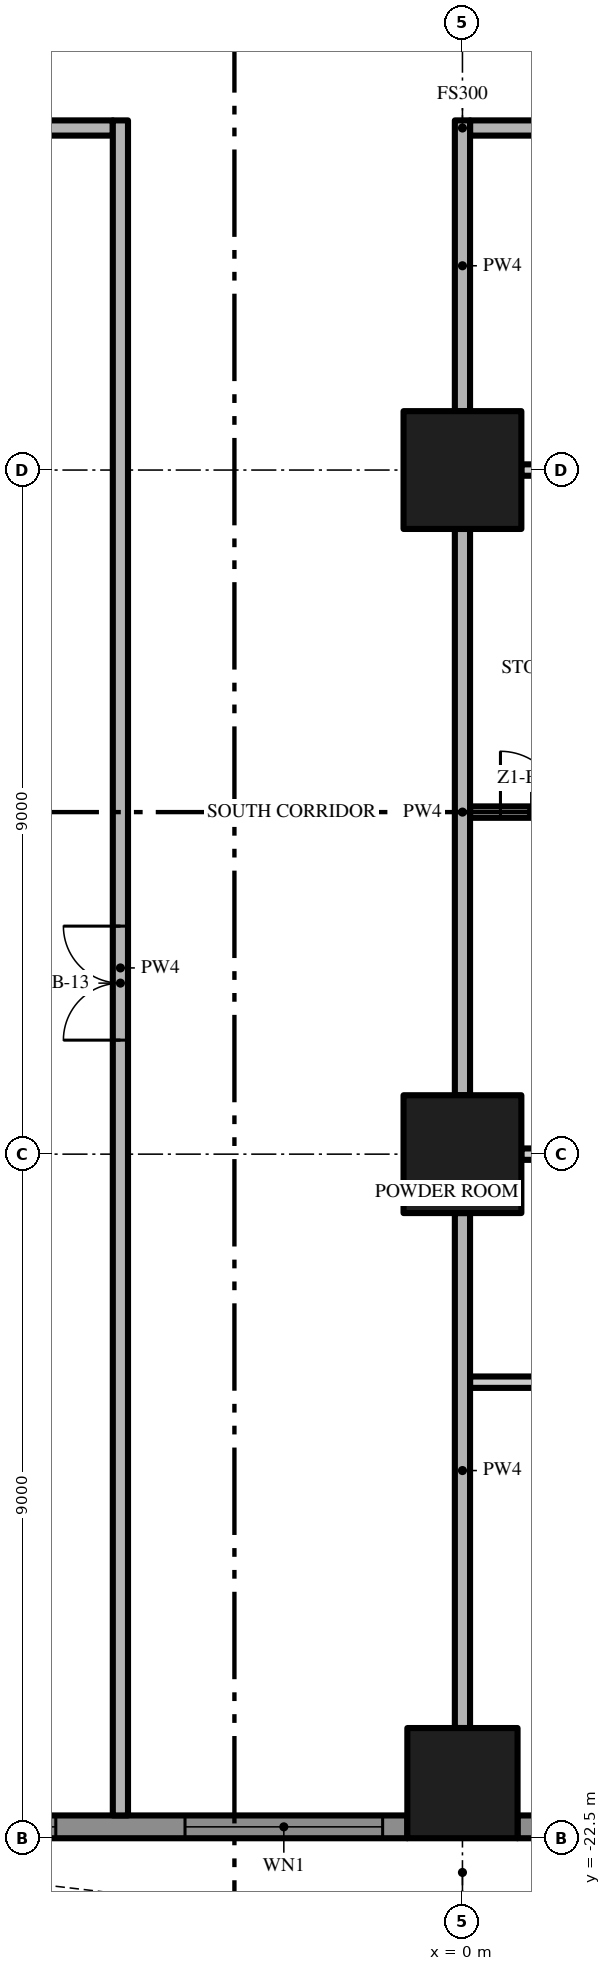
"""IFC4 building model, lengths in metres.
Left out: names, types, materials, properties, quantities, classifications, styles, units other than length and angle.
Written with IfcOpenShell. Run it as: python <this file> out.ifc"""

import sys

from ifc_helpers import new_model, si_unit, direction, frame, frame_2d, origin, origin_2d, place, context, subcontext, project, spatial, polyline, rectangle, outline, extrude, element, fill, save


model = new_model("IFC4")
c1 = context("Model", 3, precision=1e-05, world=origin(), true_north=direction((0.0, 1.0)))
c2 = subcontext(c1, "Body", "Model", "MODEL_VIEW")
j1 = project(units=[si_unit("LENGTHUNIT", "METRE"), si_unit("PLANEANGLEUNIT", "RADIAN")], contexts=[c1])
p1 = place(None, origin())
s1 = spatial("IfcSite", under=j1, at=p1, CompositionType="ELEMENT")
p2 = place(p1, origin())
s2 = spatial("IfcBuilding", under=s1, at=p2, CompositionType="ELEMENT")
p3 = place(p2, frame((0.0, 0.0, 34.0)))
s3 = spatial("IfcBuildingStorey", under=s2, at=p3, CompositionType="ELEMENT", Elevation=34.0)
p4 = place(p3, frame((0.0, -13.5, 0.0), z_axis=(0.0, 0.0, 1.0), x_axis=(1.0, 0.0, 0.0)))
e1 = element("IfcColumn", 1, at=p4, inside=s3, PredefinedType="COLUMN", context=c2, shape_type="SweptSolid", body=[
    extrude(rectangle(XDim=1.55, YDim=1.55, at=origin_2d()), origin(), (0.0, 0.0, 1.0), 3.5),
])
p5 = place(p3, frame((0.0, -21.775, 0.0), z_axis=(0.0, 0.0, 1.0), x_axis=(1.0, 0.0, 0.0)))
e2 = element("IfcColumn", 2, at=p5, inside=s3, PredefinedType="COLUMN", context=c2, shape_type="SweptSolid", body=[
    extrude(rectangle(XDim=1.45, YDim=1.45, at=origin_2d()), origin(), (0.0, 0.0, 1.0), 3.5),
])
p6 = place(p3, frame((0.0, -4.5, 0.0), z_axis=(0.0, 0.0, 1.0), x_axis=(1.0, 0.0, 0.0)))
e3 = element("IfcColumn", 3, at=p6, inside=s3, PredefinedType="COLUMN", context=c2, shape_type="SweptSolid", body=[
    extrude(rectangle(XDim=1.55, YDim=1.55, at=origin_2d()), origin(), (0.0, 0.0, 1.0), 3.5),
])
p7 = place(p3, frame((-0.725, -22.35, 0.0), z_axis=(0.0, 0.0, 1.0), x_axis=(-1.0, 0.0, 0.0)))
e4 = element("IfcWall", 4, at=p7, inside=s3, PredefinedType="SOLIDWALL", context=c2, shape_type="SweptSolid", body=[
    extrude(rectangle(XDim=7.55, YDim=0.3, at=frame_2d((3.775, 0.0))), origin(), (0.0, 0.0, 1.0), 3.5),
])
p8 = place(p7, frame((4.625, 0.0, 0.45)))
e5 = element("IfcOpeningElement", 5, at=p8, cuts=e4, PredefinedType="OPENING", context=c2, shape_type="SweptSolid", body=[
    extrude(rectangle(XDim=2.6, YDim=2.65, at=frame_2d((1.3, 1.325))), frame((0.0, 0.16, 0.0), z_axis=(0.0, -1.0, 0.0), x_axis=(1.0, 0.0, 0.0)), (0.0, 0.0, 1.0), 0.32),
])
p9 = place(p7, frame((0.325, 0.0, 0.45)))
e6 = element("IfcOpeningElement", 6, at=p9, cuts=e4, PredefinedType="OPENING", context=c2, shape_type="SweptSolid", body=[
    extrude(rectangle(XDim=2.6, YDim=2.65, at=frame_2d((1.3, 1.325))), frame((0.0, 0.16, 0.0), z_axis=(0.0, -1.0, 0.0), x_axis=(1.0, 0.0, 0.0)), (0.0, 0.0, 1.0), 0.32),
])
p10 = place(p3, frame((8.275, -22.35, 0.0), z_axis=(0.0, 0.0, 1.0), x_axis=(-1.0, 0.0, 0.0)))
e7 = element("IfcWall", 7, at=p10, inside=s3, PredefinedType="SOLIDWALL", context=c2, shape_type="SweptSolid", body=[
    extrude(rectangle(XDim=7.55, YDim=0.3, at=frame_2d((3.775, 0.0))), origin(), (0.0, 0.0, 1.0), 3.5),
])
p11 = place(p10, frame((4.625, 0.0, 0.0)))
e8 = element("IfcOpeningElement", 8, at=p11, cuts=e7, PredefinedType="OPENING", context=c2, shape_type="SweptSolid", body=[
    extrude(rectangle(XDim=2.6, YDim=2.4, at=frame_2d((1.3, 1.2))), frame((0.0, 0.16, 0.0), z_axis=(0.0, -1.0, 0.0), x_axis=(1.0, 0.0, 0.0)), (0.0, 0.0, 1.0), 0.32),
])
p12 = place(p10, frame((0.325, 0.0, 0.45)))
e9 = element("IfcOpeningElement", 9, at=p12, cuts=e7, PredefinedType="OPENING", context=c2, shape_type="SweptSolid", body=[
    extrude(rectangle(XDim=2.6, YDim=2.65, at=frame_2d((1.3, 1.325))), frame((0.0, 0.16, 0.0), z_axis=(0.0, -1.0, 0.0), x_axis=(1.0, 0.0, 0.0)), (0.0, 0.0, 1.0), 0.32),
])
p13 = place(p3, origin())
e10 = element("IfcWall", 10, at=p13, inside=s3, PredefinedType="USERDEFINED", context=c2, shape_type="SweptSolid", body=[
    extrude(outline(polyline([(-22.5, -23.451), (-21.0, -23.115), (-20.625, -23.1), (-19.5, -23.231), (-18.0, -23.755), (-16.5, -24.488), (-15.0, -25.149), (-13.5, -25.485), (-13.125, -25.5), (-12.0, -25.369), (-10.5, -24.845), (-9.0, -24.112), (-7.5, -23.451), (-6.0, -23.115), (-5.625, -23.1), (-4.5, -23.231), (-3.0, -23.755), (-1.5, -24.488), (0.0, -25.149), (1.5, -25.485), (1.875, -25.5), (3.0, -25.369), (4.5, -24.845), (6.0, -24.112), (7.5, -23.451), (9.0, -23.115), (9.375, -23.1), (10.5, -23.231), (12.0, -23.755), (13.5, -24.488), (15.0, -25.149), (16.5, -25.485), (16.875, -25.5), (18.0, -25.369), (19.5, -24.845), (21.0, -24.112), (22.5, -23.451), (22.399, -23.223), (20.895, -23.885), (19.404, -24.614), (17.944, -25.124), (16.865, -25.249), (16.533, -25.236), (15.079, -24.91), (13.605, -24.261), (12.096, -23.524), (10.556, -22.986), (9.385, -22.849), (8.967, -22.866), (7.421, -23.213), (5.895, -23.885), (4.404, -24.614), (2.944, -25.124), (1.865, -25.249), (1.533, -25.236), (0.079, -24.91), (-1.395, -24.261), (-2.904, -23.524), (-4.444, -22.986), (-5.615, -22.849), (-6.033, -22.866), (-7.579, -23.213), (-9.105, -23.885), (-10.596, -24.614), (-12.056, -25.124), (-13.135, -25.249), (-13.467, -25.236), (-14.921, -24.91), (-16.395, -24.261), (-17.904, -23.524), (-19.444, -22.986), (-20.615, -22.849), (-21.033, -22.866), (-22.555, -23.208), (-22.5, -23.451)])), origin(), (0.0, 0.0, 1.0), 0.9),
])
p14 = place(p3, frame((0.1, -16.5, 0.0), z_axis=(0.0, 0.0, 1.0), x_axis=(1.0, 0.0, 0.0)))
e11 = element("IfcWall", 11, at=p14, inside=s3, PredefinedType="PARTITIONING", context=c2, shape_type="SweptSolid", body=[
    extrude(rectangle(XDim=2.075, YDim=0.15, at=frame_2d((1.038, 0.0))), origin(), (0.0, 0.0, 1.0), 3.5),
])
p15 = place(p3, frame((8.225, -13.5, 0.0), z_axis=(0.0, 0.0, 1.0), x_axis=(-1.0, 0.0, 0.0)))
e12 = element("IfcWall", 12, at=p15, inside=s3, PredefinedType="PARTITIONING", context=c2, shape_type="SweptSolid", body=[
    extrude(rectangle(XDim=7.45, YDim=0.15, at=frame_2d((3.725, 0.0))), origin(), (0.0, 0.0, 1.0), 3.5),
])
p16 = place(p15, frame((1.725, 0.0, 0.0)))
e13 = element("IfcOpeningElement", 13, at=p16, cuts=e12, PredefinedType="OPENING", context=c2, shape_type="SweptSolid", body=[
    extrude(rectangle(XDim=1.8, YDim=2.4, at=frame_2d((0.9, 1.2))), frame((0.0, 0.085, 0.0), z_axis=(0.0, -1.0, 0.0), x_axis=(1.0, 0.0, 0.0)), (0.0, 0.0, 1.0), 0.17),
])
p17 = place(p3, frame((0.1, -9.0, 0.0), z_axis=(0.0, 0.0, 1.0), x_axis=(1.0, 0.0, 0.0)))
e14 = element("IfcWall", 14, at=p17, inside=s3, PredefinedType="PARTITIONING", context=c2, shape_type="SweptSolid", body=[
    extrude(rectangle(XDim=11.525, YDim=0.15, at=frame_2d((5.763, 0.0))), origin(), (0.0, 0.0, 1.0), 3.5),
])
p18 = place(p17, frame((0.4, 0.0, 0.0)))
e15 = element("IfcOpeningElement", 15, at=p18, cuts=e14, PredefinedType="OPENING", context=c2, shape_type="SweptSolid", body=[
    extrude(rectangle(XDim=0.8, YDim=2.0, at=frame_2d((0.4, 1.0))), frame((0.0, 0.085, 0.0), z_axis=(0.0, -1.0, 0.0), x_axis=(1.0, 0.0, 0.0)), (0.0, 0.0, 1.0), 0.17),
])
p19 = place(p17, frame((5.85, 0.0, 0.0)))
e16 = element("IfcOpeningElement", 16, at=p19, cuts=e14, PredefinedType="OPENING", context=c2, shape_type="SweptSolid", body=[
    extrude(rectangle(XDim=1.0, YDim=2.4, at=frame_2d((0.5, 1.2))), frame((0.0, 0.085, 0.0), z_axis=(0.0, -1.0, 0.0), x_axis=(1.0, 0.0, 0.0)), (0.0, 0.0, 1.0), 0.17),
])
p20 = place(p3, frame((8.225, -4.5, 0.0), z_axis=(0.0, 0.0, 1.0), x_axis=(-1.0, 0.0, 0.0)))
e17 = element("IfcWall", 17, at=p20, inside=s3, PredefinedType="PARTITIONING", context=c2, shape_type="SweptSolid", body=[
    extrude(rectangle(XDim=7.45, YDim=0.15, at=frame_2d((3.725, 0.0))), origin(), (0.0, 0.0, 1.0), 3.5),
])
p21 = place(p20, frame((5.225, 0.0, 0.0)))
e18 = element("IfcOpeningElement", 18, at=p21, cuts=e17, PredefinedType="OPENING", context=c2, shape_type="SweptSolid", body=[
    extrude(rectangle(XDim=0.8, YDim=2.0, at=frame_2d((0.4, 1.0))), frame((0.0, 0.085, 0.0), z_axis=(0.0, -1.0, 0.0), x_axis=(1.0, 0.0, 0.0)), (0.0, 0.0, 1.0), 0.17),
])
p22 = place(p3, frame((-17.4, 0.0, 0.0), z_axis=(0.0, 0.0, 1.0), x_axis=(1.0, 0.0, 0.0)))
e19 = element("IfcWall", 19, at=p22, inside=s3, PredefinedType="PARTITIONING", context=c2, shape_type="SweptSolid", body=[
    extrude(rectangle(XDim=12.8, YDim=0.2, at=frame_2d((6.4, 0.0))), origin(), (0.0, 0.0, 1.0), 3.5),
])
p23 = place(p3, frame((17.4, 0.0, 0.0), z_axis=(0.0, 0.0, 1.0), x_axis=(-1.0, 0.0, 0.0)))
e20 = element("IfcWall", 20, at=p23, inside=s3, PredefinedType="PARTITIONING", context=c2, shape_type="SweptSolid", body=[
    extrude(rectangle(XDim=17.3, YDim=0.2, at=frame_2d((8.65, 0.0))), origin(), (0.0, 0.0, 1.0), 3.5),
])
p24 = place(p23, frame((7.65, 0.0, 0.0)))
e21 = element("IfcOpeningElement", 21, at=p24, cuts=e20, PredefinedType="OPENING", context=c2, shape_type="SweptSolid", body=[
    extrude(rectangle(XDim=1.5, YDim=2.4, at=frame_2d((0.75, 1.2))), frame((0.0, 0.11, 0.0), z_axis=(0.0, -1.0, 0.0), x_axis=(1.0, 0.0, 0.0)), (0.0, 0.0, 1.0), 0.22),
])
p25 = place(p3, frame((-4.5, -22.2, 0.0), z_axis=(0.0, 0.0, 1.0), x_axis=(0.0, 1.0, 0.0)))
e22 = element("IfcWall", 22, at=p25, inside=s3, PredefinedType="PARTITIONING", context=c2, shape_type="SweptSolid", body=[
    extrude(rectangle(XDim=22.3, YDim=0.2, at=frame_2d((11.15, 0.0))), origin(), (0.0, 0.0, 1.0), 3.5),
])
p26 = place(p25, frame((10.2, 0.0, 0.0)))
e23 = element("IfcOpeningElement", 23, at=p26, cuts=e22, PredefinedType="OPENING", context=c2, shape_type="SweptSolid", body=[
    extrude(rectangle(XDim=1.5, YDim=2.4, at=frame_2d((0.75, 1.2))), frame((0.0, 0.11, 0.0), z_axis=(0.0, -1.0, 0.0), x_axis=(1.0, 0.0, 0.0)), (0.0, 0.0, 1.0), 0.22),
])
p27 = place(p3, frame((0.0, -21.05, 0.0), z_axis=(0.0, 0.0, 1.0), x_axis=(0.0, 1.0, 0.0)))
e24 = element("IfcWall", 24, at=p27, inside=s3, PredefinedType="PARTITIONING", context=c2, shape_type="SweptSolid", body=[
    extrude(rectangle(XDim=6.775, YDim=0.2, at=frame_2d((3.388, 0.0))), origin(), (0.0, 0.0, 1.0), 3.5),
])
p28 = place(p3, frame((0.0, -12.725, 0.0), z_axis=(0.0, 0.0, 1.0), x_axis=(0.0, 1.0, 0.0)))
e25 = element("IfcWall", 25, at=p28, inside=s3, PredefinedType="PARTITIONING", context=c2, shape_type="SweptSolid", body=[
    extrude(rectangle(XDim=7.45, YDim=0.2, at=frame_2d((3.725, 0.0))), origin(), (0.0, 0.0, 1.0), 3.5),
])
p29 = place(p3, frame((0.0, -3.725, 0.0), z_axis=(0.0, 0.0, 1.0), x_axis=(0.0, 1.0, 0.0)))
e26 = element("IfcWall", 26, at=p29, inside=s3, PredefinedType="PARTITIONING", context=c2, shape_type="SweptSolid", body=[
    extrude(rectangle(XDim=3.825, YDim=0.2, at=frame_2d((1.913, 0.0))), origin(), (0.0, 0.0, 1.0), 3.5),
])
p30 = place(p8, origin())
e27 = element("IfcWindow", 27, at=p30, inside=s3, PartitioningType="SINGLE_PANEL", PredefinedType="WINDOW", context=c2, shape_type="SweptSolid", body=[
    extrude(rectangle(XDim=2.6, YDim=2.65, at=frame_2d((1.3, 1.325))), frame((0.0, 0.03, 0.0), z_axis=(0.0, -1.0, 0.0), x_axis=(1.0, 0.0, 0.0)), (0.0, 0.0, 1.0), 0.06),
])
fill(e5, e27)
p31 = place(p9, origin())
e28 = element("IfcWindow", 28, at=p31, inside=s3, PartitioningType="SINGLE_PANEL", PredefinedType="WINDOW", context=c2, shape_type="SweptSolid", body=[
    extrude(rectangle(XDim=2.6, YDim=2.65, at=frame_2d((1.3, 1.325))), frame((0.0, 0.03, 0.0), z_axis=(0.0, -1.0, 0.0), x_axis=(1.0, 0.0, 0.0)), (0.0, 0.0, 1.0), 0.06),
])
fill(e6, e28)
p32 = place(p26, origin())
e29 = element("IfcDoor", 29, at=p32, inside=s3, OperationType="DOUBLE_DOOR_SINGLE_SWING", PredefinedType="DOOR", context=c2, shape_type="SweptSolid", body=[
    extrude(rectangle(XDim=1.5, YDim=2.4, at=frame_2d((0.75, 1.2))), frame((0.0, 0.025, 0.0), z_axis=(0.0, -1.0, 0.0), x_axis=(1.0, 0.0, 0.0)), (0.0, 0.0, 1.0), 0.05),
])
fill(e23, e29)
p33 = place(p18, origin())
e30 = element("IfcDoor", 30, at=p33, inside=s3, OperationType="SINGLE_SWING_LEFT", PredefinedType="DOOR", context=c2, shape_type="SweptSolid", body=[
    extrude(rectangle(XDim=0.8, YDim=2.0, at=frame_2d((0.4, 1.0))), frame((0.0, 0.025, 0.0), z_axis=(0.0, -1.0, 0.0), x_axis=(1.0, 0.0, 0.0)), (0.0, 0.0, 1.0), 0.05),
])
fill(e15, e30)
save(model, sys.argv[1])
